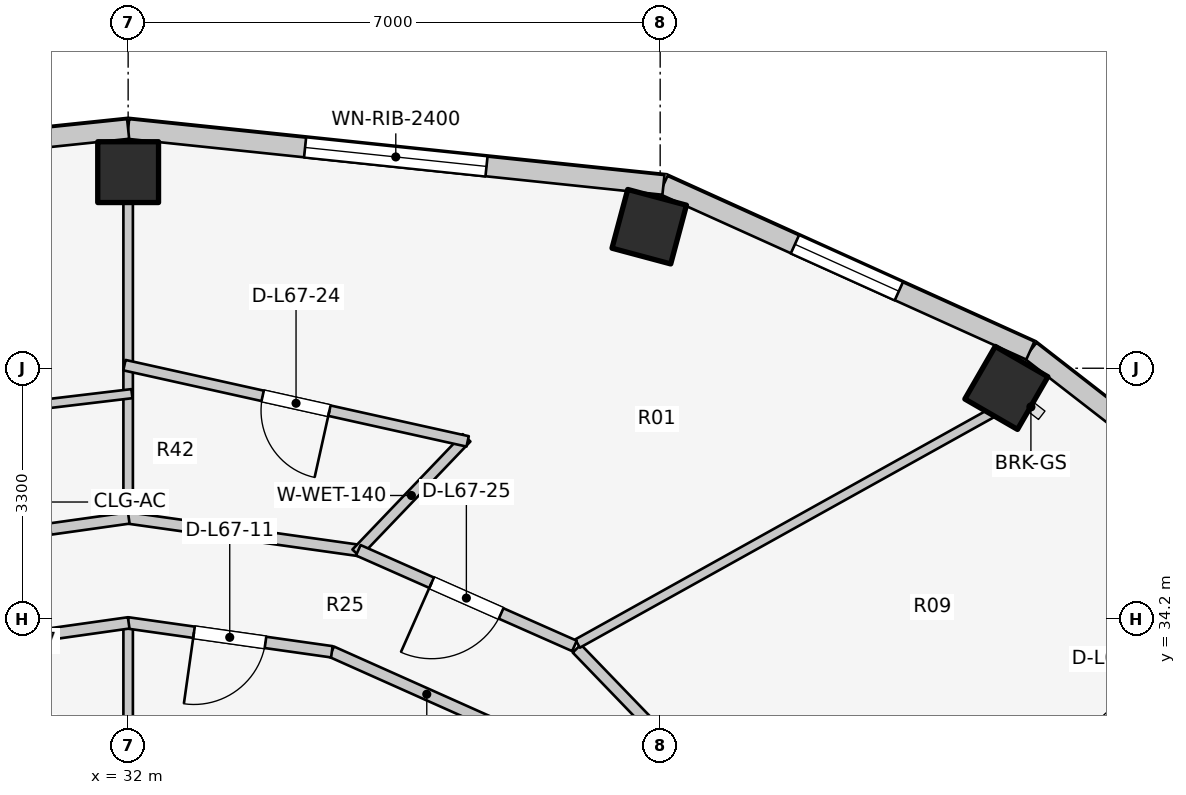
"""IFC4 building model, lengths in metres.
Left out: names, types, materials, properties, quantities, classifications, styles, units other than length and angle.
Written with IfcOpenShell. Run it as: python <this file> out.ifc"""

import sys

from ifc_helpers import new_model, si_unit, direction, frame, frame_2d, origin, origin_2d, place, context, subcontext, project, spatial, rectangle, extrude, element, fill, save


model = new_model("IFC4")
c1 = context("Model", 3, precision=1e-05, world=origin(), true_north=direction((0.0, 1.0)))
c2 = subcontext(c1, "Body", "Model", "MODEL_VIEW")
j1 = project(units=[si_unit("LENGTHUNIT", "METRE"), si_unit("PLANEANGLEUNIT", "RADIAN")], contexts=[c1])
p1 = place(None, origin())
s1 = spatial("IfcSite", under=j1, at=p1, CompositionType="ELEMENT")
p2 = place(p1, origin())
s2 = spatial("IfcBuilding", under=s1, at=p2, CompositionType="ELEMENT")
p3 = place(p2, frame((0.0, 0.0, 220.2)))
s3 = spatial("IfcBuildingStorey", under=s2, at=p3, CompositionType="ELEMENT", Elevation=220.2)
for number, where, z_axis, x_axis in (
    (1, (43.555, 37.241, 0.0), (0.0, 0.0, 1.0), (0.5, 0.866, 0.0)),
    (2, (38.856, 39.362, 0.0), (0.0, 0.0, 1.0), (0.259, 0.966, 0.0)),
    (3, (32.0, 40.08, 0.0), (0.0, 0.0, 1.0), (0.0, 1.0, 0.0)),
):
    element("IfcColumn", number, at=place(p3, frame(where, z_axis=z_axis, x_axis=x_axis)), inside=s3, PredefinedType="COLUMN", context=c2, shape_type="SweptSolid", body=[
        extrude(rectangle(XDim=0.8, YDim=0.8, at=origin_2d()), origin(), (0.0, 0.0, 1.0), 3.1),
    ])
p4 = place(p3, frame((47.558, 34.872, 0.0), z_axis=(0.0, 0.0, 1.0), x_axis=(-0.790126214723, 0.612944177563, 0.0)))
e4 = element("IfcWall", 4, at=p4, inside=s3, PredefinedType="STANDARD", context=c2, shape_type="SweptSolid", body=[
    extrude(rectangle(XDim=4.667, YDim=0.26, at=frame_2d((2.333, 0.0))), origin(), (0.0, 0.0, 1.0), 2.85),
])
p5 = place(p3, frame((43.87, 37.733, 0.0), z_axis=(0.0, 0.0, 1.0), x_axis=(-0.911427484938, 0.411460738952, 0.0)))
e5 = element("IfcWall", 5, at=p5, inside=s3, PredefinedType="STANDARD", context=c2, shape_type="SweptSolid", body=[
    extrude(rectangle(XDim=5.296, YDim=0.26, at=frame_2d((2.648, 0.0))), origin(), (0.0, 0.0, 1.0), 2.85),
])
p6 = place(p5, frame((1.898, 0.0, 0.75)))
e6 = element("IfcOpeningElement", 6, at=p6, cuts=e5, PredefinedType="OPENING", context=c2, shape_type="SweptSolid", body=[
    extrude(rectangle(XDim=1.5, YDim=1.6, at=frame_2d((0.75, 0.8))), frame((0.0, 0.14, 0.0), z_axis=(0.0, -1.0, 0.0), x_axis=(1.0, 0.0, 0.0)), (0.0, 0.0, 1.0), 0.28),
])
p7 = place(p3, frame((39.043, 39.912, 0.0), z_axis=(0.0, 0.0, 1.0), x_axis=(-0.994582822721, 0.103947144014, 0.0)))
e7 = element("IfcWall", 7, at=p7, inside=s3, PredefinedType="STANDARD", context=c2, shape_type="SweptSolid", body=[
    extrude(rectangle(XDim=7.081, YDim=0.26, at=frame_2d((3.541, 0.0))), origin(), (0.0, 0.0, 1.0), 2.85),
])
p8 = place(p7, frame((2.341, 0.0, 0.75)))
e8 = element("IfcOpeningElement", 8, at=p8, cuts=e7, PredefinedType="OPENING", context=c2, shape_type="SweptSolid", body=[
    extrude(rectangle(XDim=2.4, YDim=1.7, at=frame_2d((1.2, 0.85))), frame((0.0, 0.14, 0.0), z_axis=(0.0, -1.0, 0.0), x_axis=(1.0, 0.0, 0.0)), (0.0, 0.0, 1.0), 0.28),
])
p9 = place(p3, frame((32.0, 40.648, 0.0), z_axis=(0.0, 0.0, 1.0), x_axis=(-0.994582822721, -0.103947144014, 0.0)))
e9 = element("IfcWall", 9, at=p9, inside=s3, PredefinedType="STANDARD", context=c2, shape_type="SweptSolid", body=[
    extrude(rectangle(XDim=7.081, YDim=0.26, at=frame_2d((3.541, 0.0))), origin(), (0.0, 0.0, 1.0), 2.85),
])
p10 = place(p9, frame((2.791, 0.0, 0.75)))
e10 = element("IfcOpeningElement", 10, at=p10, cuts=e9, PredefinedType="OPENING", context=c2, shape_type="SweptSolid", body=[
    extrude(rectangle(XDim=1.5, YDim=1.6, at=frame_2d((0.75, 0.8))), frame((0.0, 0.14, 0.0), z_axis=(0.0, -1.0, 0.0), x_axis=(1.0, 0.0, 0.0)), (0.0, 0.0, 1.0), 0.28),
])
p11 = place(p3, frame((32.0, 31.1, 0.0), z_axis=(0.0, 0.0, 1.0), x_axis=(0.0, 1.0, 0.0)))
e11 = element("IfcWall", 11, at=p11, inside=s3, PredefinedType="PARTITIONING", context=c2, shape_type="SweptSolid", body=[
    extrude(rectangle(XDim=3.05, YDim=0.125, at=frame_2d((1.525, 0.0))), origin(), (0.0, 0.0, 1.0), 2.376),
])
p12 = place(p3, frame((37.181, 32.652, 0.0), z_axis=(0.0, 0.0, 1.0), x_axis=(-0.913120130558, 0.407690602257, 0.0)))
e12 = element("IfcWall", 12, at=p12, inside=s3, PredefinedType="PARTITIONING", context=c2, shape_type="SweptSolid", body=[
    extrude(rectangle(XDim=2.743, YDim=0.15, at=frame_2d((1.371, 0.0))), origin(), (0.0, 0.0, 1.0), 2.376),
])
p13 = place(p3, frame((34.68, 33.77, 0.0), z_axis=(0.0, 0.0, 1.0), x_axis=(-0.990132151456, 0.140136799779, 0.0)))
e13 = element("IfcWall", 13, at=p13, inside=s3, PredefinedType="PARTITIONING", context=c2, shape_type="SweptSolid", body=[
    extrude(rectangle(XDim=2.714, YDim=0.15, at=frame_2d((1.357, 0.0))), origin(), (0.0, 0.0, 1.0), 2.376),
])
p14 = place(p13, frame((0.882, 0.0, 0.0)))
e14 = element("IfcOpeningElement", 14, at=p14, cuts=e13, PredefinedType="OPENING", context=c2, shape_type="SweptSolid", body=[
    extrude(rectangle(XDim=0.95, YDim=2.1, at=frame_2d((0.475, 1.05))), frame((0.0, 0.085, 0.0), z_axis=(0.0, -1.0, 0.0), x_axis=(1.0, 0.0, 0.0)), (0.0, 0.0, 1.0), 0.17),
])
p15 = place(p3, frame((32.007, 34.15, 0.0), z_axis=(0.0, 0.0, 1.0), x_axis=(-0.990132151456, -0.140136799779, 0.0)))
e15 = element("IfcWall", 15, at=p15, inside=s3, PredefinedType="PARTITIONING", context=c2, shape_type="SweptSolid", body=[
    extrude(rectangle(XDim=2.714, YDim=0.15, at=frame_2d((1.357, 0.0))), origin(), (0.0, 0.0, 1.0), 2.376),
])
p16 = place(p3, frame((37.903, 33.812, 0.0), z_axis=(0.0, 0.0, 1.0), x_axis=(0.694032962553, -0.719943224768, 0.0)))
e16 = element("IfcWall", 16, at=p16, inside=s3, PredefinedType="PARTITIONING", context=c2, shape_type="SweptSolid", body=[
    extrude(rectangle(XDim=2.158, YDim=0.15, at=frame_2d((1.079, 0.0))), origin(), (0.0, 0.0, 1.0), 2.376),
])
p17 = place(p3, frame((37.913, 33.878, 0.0), z_axis=(0.0, 0.0, 1.0), x_axis=(0.87377679808, 0.486327160599, 0.0)))
e17 = element("IfcWall", 17, at=p17, inside=s3, PredefinedType="PARTITIONING", context=c2, shape_type="SweptSolid", body=[
    extrude(rectangle(XDim=6.24, YDim=0.125, at=frame_2d((3.12, 0.0))), origin(), (0.0, 0.0, 1.0), 2.376),
])
p18 = place(p3, frame((32.0, 35.585, 0.0), z_axis=(0.0, 0.0, 1.0), x_axis=(0.0, 1.0, 0.0)))
e18 = element("IfcWall", 18, at=p18, inside=s3, PredefinedType="PARTITIONING", context=c2, shape_type="SweptSolid", body=[
    extrude(rectangle(XDim=4.115, YDim=0.125, at=frame_2d((2.058, 0.0))), origin(), (0.0, 0.0, 1.0), 2.376),
])
p19 = place(p3, frame((35.085, 35.096, 0.0), z_axis=(0.0, 0.0, 1.0), x_axis=(-0.990254086283, 0.139272555084, 0.0)))
e19 = element("IfcWall", 19, at=p19, inside=s3, PredefinedType="PARTITIONING", context=c2, shape_type="SweptSolid", body=[
    extrude(rectangle(XDim=3.166, YDim=0.15, at=frame_2d((1.583, 0.0))), origin(), (0.0, 0.0, 1.0), 2.376),
])
p20 = place(p3, frame((35.001, 35.067, 0.0), z_axis=(0.0, 0.0, 1.0), x_axis=(0.691180416361, 0.722682248321, 0.0)))
e20 = element("IfcWall", 20, at=p20, inside=s3, PredefinedType="PLUMBINGWALL", context=c2, shape_type="SweptSolid", body=[
    extrude(rectangle(XDim=2.1, YDim=0.14, at=frame_2d((1.05, 0.0))), origin(), (0.0, 0.0, 1.0), 2.385),
])
p21 = place(p3, frame((36.467, 36.538, 0.0), z_axis=(0.0, 0.0, 1.0), x_axis=(-0.976214372251, 0.21680751696, 0.0)))
e21 = element("IfcWall", 21, at=p21, inside=s3, PredefinedType="PLUMBINGWALL", context=c2, shape_type="SweptSolid", body=[
    extrude(rectangle(XDim=4.626, YDim=0.14, at=frame_2d((2.313, 0.0))), origin(), (0.0, 0.0, 1.0), 2.376),
])
p22 = place(p21, frame((1.863, 0.0, 0.0)))
e22 = element("IfcOpeningElement", 22, at=p22, cuts=e21, PredefinedType="OPENING", context=c2, shape_type="SweptSolid", body=[
    extrude(rectangle(XDim=0.9, YDim=2.1, at=frame_2d((0.45, 1.05))), frame((0.0, 0.08, 0.0), z_axis=(0.0, -1.0, 0.0), x_axis=(1.0, 0.0, 0.0)), (0.0, 0.0, 1.0), 0.16),
])
p23 = place(p3, frame((37.872, 33.847, 0.0), z_axis=(0.0, 0.0, 1.0), x_axis=(-0.914490094652, 0.40460828808, 0.0)))
e23 = element("IfcWall", 23, at=p23, inside=s3, PredefinedType="PARTITIONING", context=c2, shape_type="SweptSolid", body=[
    extrude(rectangle(XDim=3.11, YDim=0.15, at=frame_2d((1.555, 0.0))), origin(), (0.0, 0.0, 1.0), 2.376),
])
p24 = place(p23, frame((1.055, 0.0, 0.0)))
e24 = element("IfcOpeningElement", 24, at=p24, cuts=e23, PredefinedType="OPENING", context=c2, shape_type="SweptSolid", body=[
    extrude(rectangle(XDim=1.0, YDim=2.1, at=frame_2d((0.5, 1.05))), frame((0.0, 0.085, 0.0), z_axis=(0.0, -1.0, 0.0), x_axis=(1.0, 0.0, 0.0)), (0.0, 0.0, 1.0), 0.17),
])
p25 = place(p3, frame((32.05, 37.166, 0.0), z_axis=(0.0, 0.0, 1.0), x_axis=(-0.992963303559, -0.118422454736, 0.0)))
e25 = element("IfcWall", 25, at=p25, inside=s3, PredefinedType="MOVABLE", context=c2, shape_type="SweptSolid", body=[
    extrude(rectangle(XDim=4.622, YDim=0.12, at=frame_2d((2.311, 0.0))), origin(), (0.0, 0.0, 1.0), 2.376),
])
p26 = place(p25, frame((1.836, 0.0, 0.0)))
e26 = element("IfcOpeningElement", 26, at=p26, cuts=e25, PredefinedType="OPENING", context=c2, shape_type="SweptSolid", body=[
    extrude(rectangle(XDim=0.95, YDim=2.1, at=frame_2d((0.475, 1.05))), frame((0.0, 0.07, 0.0), z_axis=(0.0, -1.0, 0.0), x_axis=(1.0, 0.0, 0.0)), (0.0, 0.0, 1.0), 0.14),
])
p27 = place(p3, frame((32.008, 35.53, 0.0), z_axis=(0.0, 0.0, 1.0), x_axis=(-0.990257602807, -0.139247549651, 0.0)))
e27 = element("IfcWall", 27, at=p27, inside=s3, PredefinedType="PARTITIONING", context=c2, shape_type="SweptSolid", body=[
    extrude(rectangle(XDim=3.082, YDim=0.15, at=frame_2d((1.541, 0.0))), origin(), (0.0, 0.0, 1.0), 2.376),
])
p28 = place(p27, frame((1.041, 0.0, 0.0)))
e28 = element("IfcOpeningElement", 28, at=p28, cuts=e27, PredefinedType="OPENING", context=c2, shape_type="SweptSolid", body=[
    extrude(rectangle(XDim=1.0, YDim=2.1, at=frame_2d((0.5, 1.05))), frame((0.0, 0.085, 0.0), z_axis=(0.0, -1.0, 0.0), x_axis=(1.0, 0.0, 0.0)), (0.0, 0.0, 1.0), 0.17),
])
p29 = place(p6, origin())
e29 = element("IfcWindow", 29, at=p29, inside=s3, PartitioningType="SINGLE_PANEL", PredefinedType="WINDOW", context=c2, shape_type="SweptSolid", body=[
    extrude(rectangle(XDim=1.5, YDim=1.6, at=frame_2d((0.75, 0.8))), frame((0.0, 0.03, 0.0), z_axis=(0.0, -1.0, 0.0), x_axis=(1.0, 0.0, 0.0)), (0.0, 0.0, 1.0), 0.06),
])
fill(e6, e29)
p30 = place(p8, origin())
e30 = element("IfcWindow", 30, at=p30, inside=s3, PartitioningType="SINGLE_PANEL", PredefinedType="WINDOW", context=c2, shape_type="SweptSolid", body=[
    extrude(rectangle(XDim=2.4, YDim=1.7, at=frame_2d((1.2, 0.85))), frame((0.0, 0.03, 0.0), z_axis=(0.0, -1.0, 0.0), x_axis=(1.0, 0.0, 0.0)), (0.0, 0.0, 1.0), 0.06),
])
fill(e8, e30)
p31 = place(p14, origin())
e31 = element("IfcDoor", 31, at=p31, inside=s3, OperationType="SINGLE_SWING_RIGHT", PredefinedType="DOOR", context=c2, shape_type="SweptSolid", body=[
    extrude(rectangle(XDim=0.95, YDim=2.1, at=frame_2d((0.475, 1.05))), frame((0.0, 0.025, 0.0), z_axis=(0.0, -1.0, 0.0), x_axis=(1.0, 0.0, 0.0)), (0.0, 0.0, 1.0), 0.05),
])
fill(e14, e31)
p32 = place(p22, origin())
e32 = element("IfcDoor", 32, at=p32, inside=s3, OperationType="SINGLE_SWING_LEFT", PredefinedType="DOOR", context=c2, shape_type="SweptSolid", body=[
    extrude(rectangle(XDim=0.9, YDim=2.1, at=frame_2d((0.45, 1.05))), frame((0.0, 0.025, 0.0), z_axis=(0.0, -1.0, 0.0), x_axis=(1.0, 0.0, 0.0)), (0.0, 0.0, 1.0), 0.05),
])
fill(e22, e32)
p33 = place(p24, origin())
e33 = element("IfcDoor", 33, at=p33, inside=s3, OperationType="SINGLE_SWING_RIGHT", PredefinedType="DOOR", context=c2, shape_type="SweptSolid", body=[
    extrude(rectangle(XDim=1.0, YDim=2.1, at=frame_2d((0.5, 1.05))), frame((0.0, 0.025, 0.0), z_axis=(0.0, -1.0, 0.0), x_axis=(1.0, 0.0, 0.0)), (0.0, 0.0, 1.0), 0.05),
])
fill(e24, e33)
save(model, sys.argv[1])
